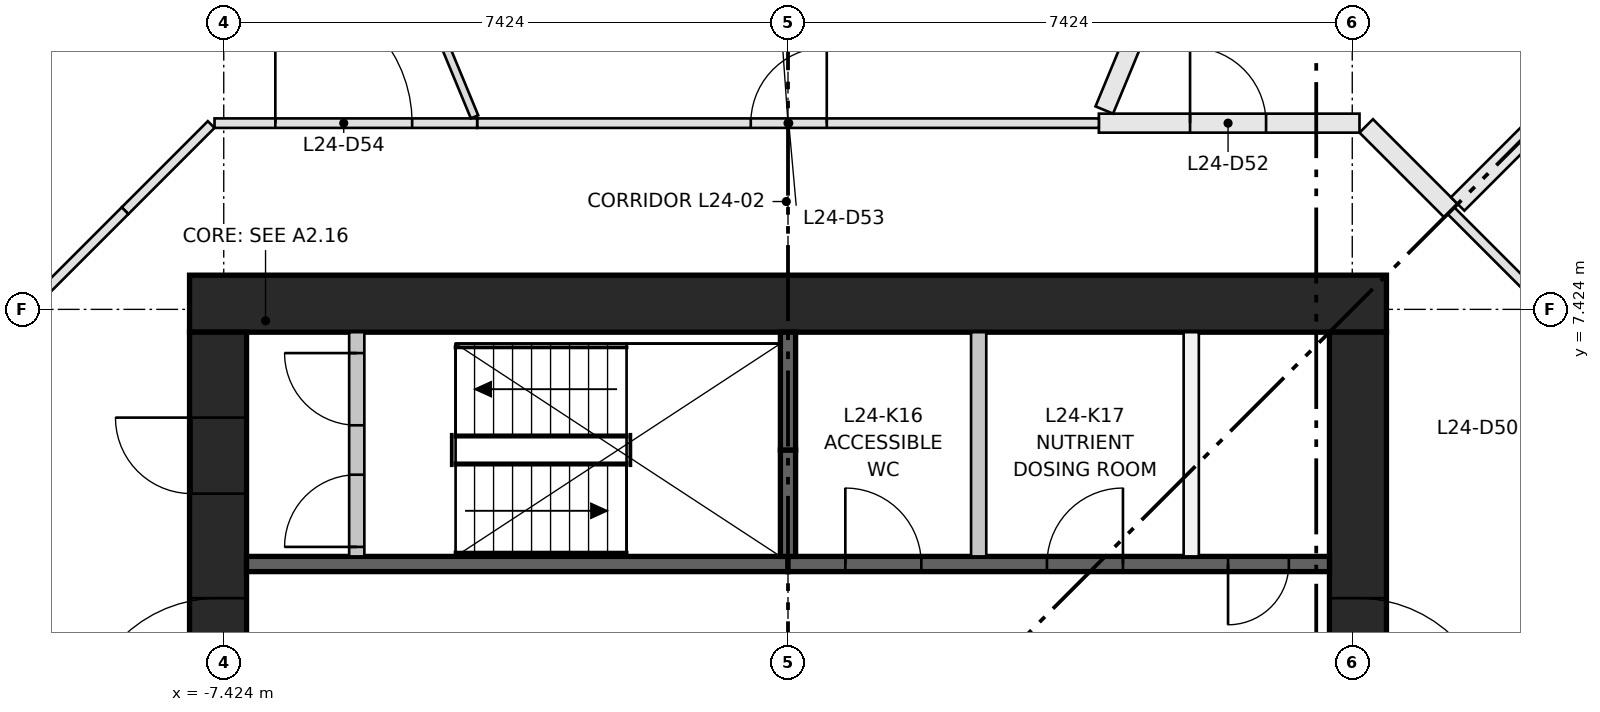
"""IFC4 building model, lengths in metres.
Left out: names, types, materials, properties, quantities, classifications, styles, units other than length and angle.
Written with IfcOpenShell. Run it as: python <this file> out.ifc"""

import sys

from ifc_helpers import new_model, si_unit, direction, frame, frame_2d, origin, place, context, subcontext, project, spatial, rectangle, extrude, element, fill, save


model = new_model("IFC4")
c1 = context("Model", 3, precision=1e-05, world=origin(), true_north=direction((0.0, 1.0)))
c2 = subcontext(c1, "Body", "Model", "MODEL_VIEW")
j1 = project(units=[si_unit("LENGTHUNIT", "METRE"), si_unit("PLANEANGLEUNIT", "RADIAN")], contexts=[c1])
p1 = place(None, origin())
s1 = spatial("IfcSite", under=j1, at=p1, CompositionType="ELEMENT")
p2 = place(p1, origin())
s2 = spatial("IfcBuilding", under=s1, at=p2, CompositionType="ELEMENT")
p3 = place(p2, frame((0.0, 0.0, 94.65)))
s3 = spatial("IfcBuildingStorey", under=s2, at=p3, CompositionType="ELEMENT", Elevation=94.65)
p4 = place(p3, frame((-7.874, 7.499, 0.0), z_axis=(0.0, 0.0, 1.0), x_axis=(1.0, 0.0, 0.0)))
e1 = element("IfcWall", 1, at=p4, inside=s3, PredefinedType="SHEAR", context=c2, shape_type="SweptSolid", body=[
    extrude(rectangle(XDim=15.748, YDim=0.75, at=frame_2d((7.874, 0.0))), origin(), (0.0, 0.0, 1.0), 3.65),
])
p5 = place(p3, frame((-7.499, -7.124, 0.0), z_axis=(0.0, 0.0, 1.0), x_axis=(0.0, 1.0, 0.0)))
e2 = element("IfcWall", 2, at=p5, inside=s3, PredefinedType="SHEAR", context=c2, shape_type="SweptSolid", body=[
    extrude(rectangle(XDim=14.248, YDim=0.75, at=frame_2d((7.124, 0.0))), origin(), (0.0, 0.0, 1.0), 3.65),
])
p6 = place(p5, frame((6.624, 0.0, 0.0)))
e3 = element("IfcOpeningElement", 3, at=p6, cuts=e2, PredefinedType="OPENING", context=c2, shape_type="SweptSolid", body=[
    extrude(rectangle(XDim=1.0, YDim=2.1, at=frame_2d((0.5, 1.05))), frame((0.0, 0.385, 0.0), z_axis=(0.0, -1.0, 0.0), x_axis=(1.0, 0.0, 0.0)), (0.0, 0.0, 1.0), 0.77),
])
p7 = place(p5, frame((3.5, 0.0, 0.0)))
e4 = element("IfcOpeningElement", 4, at=p7, cuts=e2, PredefinedType="OPENING", context=c2, shape_type="SweptSolid", body=[
    extrude(rectangle(XDim=1.8, YDim=2.1, at=frame_2d((0.9, 1.05))), frame((0.0, 0.385, 0.0), z_axis=(0.0, -1.0, 0.0), x_axis=(1.0, 0.0, 0.0)), (0.0, 0.0, 1.0), 0.77),
])
p8 = place(p5, frame((8.948, 0.0, 0.0)))
e5 = element("IfcOpeningElement", 5, at=p8, cuts=e2, PredefinedType="OPENING", context=c2, shape_type="SweptSolid", body=[
    extrude(rectangle(XDim=1.8, YDim=2.1, at=frame_2d((0.9, 1.05))), frame((0.0, 0.385, 0.0), z_axis=(0.0, -1.0, 0.0), x_axis=(1.0, 0.0, 0.0)), (0.0, 0.0, 1.0), 0.77),
])
p9 = place(p5, frame((12.124, 0.0, 0.0)))
e6 = element("IfcOpeningElement", 6, at=p9, cuts=e2, PredefinedType="OPENING", context=c2, shape_type="SweptSolid", body=[
    extrude(rectangle(XDim=1.0, YDim=2.1, at=frame_2d((0.5, 1.05))), frame((0.0, 0.385, 0.0), z_axis=(0.0, -1.0, 0.0), x_axis=(1.0, 0.0, 0.0)), (0.0, 0.0, 1.0), 0.77),
])
p10 = place(p3, frame((7.499, -7.124, 0.0), z_axis=(0.0, 0.0, 1.0), x_axis=(0.0, 1.0, 0.0)))
e7 = element("IfcWall", 7, at=p10, inside=s3, PredefinedType="SHEAR", context=c2, shape_type="SweptSolid", body=[
    extrude(rectangle(XDim=14.248, YDim=0.75, at=frame_2d((7.124, 0.0))), origin(), (0.0, 0.0, 1.0), 3.65),
])
p11 = place(p10, frame((6.624, 0.0, 0.0)))
e8 = element("IfcOpeningElement", 8, at=p11, cuts=e7, PredefinedType="OPENING", context=c2, shape_type="SweptSolid", body=[
    extrude(rectangle(XDim=1.0, YDim=2.1, at=frame_2d((0.5, 1.05))), frame((0.0, 0.385, 0.0), z_axis=(0.0, -1.0, 0.0), x_axis=(1.0, 0.0, 0.0)), (0.0, 0.0, 1.0), 0.77),
])
p12 = place(p10, frame((3.5, 0.0, 0.0)))
e9 = element("IfcOpeningElement", 9, at=p12, cuts=e7, PredefinedType="OPENING", context=c2, shape_type="SweptSolid", body=[
    extrude(rectangle(XDim=1.8, YDim=2.1, at=frame_2d((0.9, 1.05))), frame((0.0, 0.385, 0.0), z_axis=(0.0, -1.0, 0.0), x_axis=(1.0, 0.0, 0.0)), (0.0, 0.0, 1.0), 0.77),
])
p13 = place(p10, frame((8.948, 0.0, 0.0)))
e10 = element("IfcOpeningElement", 10, at=p13, cuts=e7, PredefinedType="OPENING", context=c2, shape_type="SweptSolid", body=[
    extrude(rectangle(XDim=1.8, YDim=2.1, at=frame_2d((0.9, 1.05))), frame((0.0, 0.385, 0.0), z_axis=(0.0, -1.0, 0.0), x_axis=(1.0, 0.0, 0.0)), (0.0, 0.0, 1.0), 0.77),
])
p14 = place(p3, frame((-7.124, 4.074, 0.0), z_axis=(0.0, 0.0, 1.0), x_axis=(1.0, 0.0, 0.0)))
e11 = element("IfcWall", 11, at=p14, inside=s3, PredefinedType="SHEAR", context=c2, shape_type="SweptSolid", body=[
    extrude(rectangle(XDim=7.124, YDim=0.2, at=frame_2d((3.562, 0.0))), origin(), (0.0, 0.0, 1.0), 3.3),
])
p15 = place(p3, frame((0.0, 4.074, 0.0), z_axis=(0.0, 0.0, 1.0), x_axis=(1.0, 0.0, 0.0)))
e12 = element("IfcWall", 12, at=p15, inside=s3, PredefinedType="SHEAR", context=c2, shape_type="SweptSolid", body=[
    extrude(rectangle(XDim=7.124, YDim=0.2, at=frame_2d((3.562, 0.0))), origin(), (0.0, 0.0, 1.0), 3.3),
])
p16 = place(p15, frame((0.754, 0.0, 0.0)))
e13 = element("IfcOpeningElement", 13, at=p16, cuts=e12, PredefinedType="OPENING", context=c2, shape_type="SweptSolid", body=[
    extrude(rectangle(XDim=1.0, YDim=2.1, at=frame_2d((0.5, 1.05))), frame((0.0, 0.11, 0.0), z_axis=(0.0, -1.0, 0.0), x_axis=(1.0, 0.0, 0.0)), (0.0, 0.0, 1.0), 0.22),
])
p17 = place(p15, frame((3.407, 0.0, 0.0)))
e14 = element("IfcOpeningElement", 14, at=p17, cuts=e12, PredefinedType="OPENING", context=c2, shape_type="SweptSolid", body=[
    extrude(rectangle(XDim=1.0, YDim=2.1, at=frame_2d((0.5, 1.05))), frame((0.0, 0.11, 0.0), z_axis=(0.0, -1.0, 0.0), x_axis=(1.0, 0.0, 0.0)), (0.0, 0.0, 1.0), 0.22),
])
p18 = place(p15, frame((5.79, 0.0, 0.0)))
e15 = element("IfcOpeningElement", 15, at=p18, cuts=e12, PredefinedType="OPENING", context=c2, shape_type="SweptSolid", body=[
    extrude(rectangle(XDim=0.8, YDim=2.1, at=frame_2d((0.4, 1.05))), frame((0.0, 0.11, 0.0), z_axis=(0.0, -1.0, 0.0), x_axis=(1.0, 0.0, 0.0)), (0.0, 0.0, 1.0), 0.22),
])
p19 = place(p3, frame((0.0, 4.174, 0.0), z_axis=(0.0, 0.0, 1.0), x_axis=(0.0, 1.0, 0.0)))
e16 = element("IfcWall", 16, at=p19, inside=s3, PredefinedType="SHEAR", context=c2, shape_type="SweptSolid", body=[
    extrude(rectangle(XDim=1.4, YDim=0.2, at=frame_2d((0.7, 0.0))), origin(), (0.0, 0.0, 1.0), 3.3),
])
p20 = place(p3, frame((0.0, 5.574, 0.0), z_axis=(0.0, 0.0, 1.0), x_axis=(0.0, 1.0, 0.0)))
e17 = element("IfcWall", 17, at=p20, inside=s3, PredefinedType="SHEAR", context=c2, shape_type="SweptSolid", body=[
    extrude(rectangle(XDim=1.55, YDim=0.2, at=frame_2d((0.775, 0.0))), origin(), (0.0, 0.0, 1.0), 3.3),
])
for number, where, z_axis, x_axis in (
    (18, (2.509, 4.174, 0.0), (0.0, 0.0, 1.0), (0.0, 1.0, 0.0)),
    (19, (5.305, 4.174, 0.0), (0.0, 0.0, 1.0), (0.0, 1.0, 0.0)),
):
    element("IfcWall", number, at=place(p3, frame(where, z_axis=z_axis, x_axis=x_axis)), inside=s3, PredefinedType="PARTITIONING", context=c2, shape_type="SweptSolid", body=[
        extrude(rectangle(XDim=2.95, YDim=0.2, at=frame_2d((1.475, 0.0))), origin(), (0.0, 0.0, 1.0), 3.3),
    ])
p21 = place(p3, frame((-5.674, 4.174, 0.0), z_axis=(0.0, 0.0, 1.0), x_axis=(0.0, 1.0, 0.0)))
e20 = element("IfcWall", 20, at=p21, inside=s3, PredefinedType="PARTITIONING", context=c2, shape_type="SweptSolid", body=[
    extrude(rectangle(XDim=2.95, YDim=0.2, at=frame_2d((1.475, 0.0))), origin(), (0.0, 0.0, 1.0), 3.3),
])
p22 = place(p21, frame((0.125, 0.0, 0.0)))
e21 = element("IfcOpeningElement", 21, at=p22, cuts=e20, PredefinedType="OPENING", context=c2, shape_type="SweptSolid", body=[
    extrude(rectangle(XDim=0.95, YDim=2.1, at=frame_2d((0.475, 1.05))), frame((0.0, 0.11, 0.0), z_axis=(0.0, -1.0, 0.0), x_axis=(1.0, 0.0, 0.0)), (0.0, 0.0, 1.0), 0.22),
])
p23 = place(p21, frame((1.725, 0.0, 0.0)))
e22 = element("IfcOpeningElement", 22, at=p23, cuts=e20, PredefinedType="OPENING", context=c2, shape_type="SweptSolid", body=[
    extrude(rectangle(XDim=0.95, YDim=2.1, at=frame_2d((0.475, 1.05))), frame((0.0, 0.11, 0.0), z_axis=(0.0, -1.0, 0.0), x_axis=(1.0, 0.0, 0.0)), (0.0, 0.0, 1.0), 0.22),
])
p24 = place(p3, frame((8.722, 8.722, 0.0), z_axis=(0.0, 0.0, 1.0), x_axis=(0.70718294931, -0.707030604857, 0.0)))
e23 = element("IfcWall", 23, at=p24, inside=s3, PredefinedType="PARTITIONING", context=c2, shape_type="SweptSolid", body=[
    extrude(rectangle(XDim=1.603, YDim=0.125, at=frame_2d((0.801, 0.0))), origin(), (0.0, 0.0, 1.0), 3.3),
])
p25 = place(p3, frame((4.09, 9.874, 0.0), z_axis=(0.0, 0.0, 1.0), x_axis=(1.0, 0.0, 0.0)))
e24 = element("IfcWall", 24, at=p25, inside=s3, PredefinedType="PARTITIONING", context=c2, shape_type="SweptSolid", body=[
    extrude(rectangle(XDim=3.429, YDim=0.25, at=frame_2d((1.715, 0.0))), origin(), (0.0, 0.0, 1.0), 3.3),
])
p26 = place(p25, frame((1.2, 0.0, 0.0)))
e25 = element("IfcOpeningElement", 25, at=p26, cuts=e24, PredefinedType="OPENING", context=c2, shape_type="SweptSolid", body=[
    extrude(rectangle(XDim=1.0, YDim=2.1, at=frame_2d((0.5, 1.05))), frame((0.0, 0.135, 0.0), z_axis=(0.0, -1.0, 0.0), x_axis=(1.0, 0.0, 0.0)), (0.0, 0.0, 1.0), 0.27),
])
p27 = place(p3, frame((7.608, 9.837, 0.0), z_axis=(0.0, 0.0, 1.0), x_axis=(0.707029353672, -0.707184200224, 0.0)))
e26 = element("IfcWall", 26, at=p27, inside=s3, PredefinedType="PARTITIONING", context=c2, shape_type="SweptSolid", body=[
    extrude(rectangle(XDim=1.577, YDim=0.25, at=frame_2d((0.788, 0.0))), origin(), (0.0, 0.0, 1.0), 3.3),
])
p28 = place(p3, frame((-4.09, 9.874, 0.0), z_axis=(0.0, 0.0, 1.0), x_axis=(1.0, 0.0, 0.0)))
e27 = element("IfcWall", 27, at=p28, inside=s3, PredefinedType="PARTITIONING", context=c2, shape_type="SweptSolid", body=[
    extrude(rectangle(XDim=8.18, YDim=0.125, at=frame_2d((4.09, 0.0))), origin(), (0.0, 0.0, 1.0), 3.3),
])
p29 = place(p28, frame((3.6, 0.0, 0.0)))
e28 = element("IfcOpeningElement", 28, at=p29, cuts=e27, PredefinedType="OPENING", context=c2, shape_type="SweptSolid", body=[
    extrude(rectangle(XDim=1.0, YDim=2.1, at=frame_2d((0.5, 1.05))), frame((0.0, 0.073, 0.0), z_axis=(0.0, -1.0, 0.0), x_axis=(1.0, 0.0, 0.0)), (0.0, 0.0, 1.0), 0.145),
])
p30 = place(p3, frame((-8.722, 8.722, 0.0), z_axis=(0.0, 0.0, 1.0), x_axis=(0.707030604857, 0.70718294931, 0.0)))
e29 = element("IfcWall", 29, at=p30, inside=s3, PredefinedType="PARTITIONING", context=c2, shape_type="SweptSolid", body=[
    extrude(rectangle(XDim=1.603, YDim=0.125, at=frame_2d((0.801, 0.0))), origin(), (0.0, 0.0, 1.0), 3.3),
])
p31 = place(p3, frame((-7.545, 9.874, 0.0), z_axis=(0.0, 0.0, 1.0), x_axis=(1.0, 0.0, 0.0)))
e30 = element("IfcWall", 30, at=p31, inside=s3, PredefinedType="PARTITIONING", context=c2, shape_type="SweptSolid", body=[
    extrude(rectangle(XDim=3.455, YDim=0.125, at=frame_2d((1.728, 0.0))), origin(), (0.0, 0.0, 1.0), 3.3),
])
p32 = place(p31, frame((0.8, 0.0, 0.0)))
e31 = element("IfcOpeningElement", 31, at=p32, cuts=e30, PredefinedType="OPENING", context=c2, shape_type="SweptSolid", body=[
    extrude(rectangle(XDim=1.8, YDim=2.1, at=frame_2d((0.9, 1.05))), frame((0.0, 0.073, 0.0), z_axis=(0.0, -1.0, 0.0), x_axis=(1.0, 0.0, 0.0)), (0.0, 0.0, 1.0), 0.145),
])
p33 = place(p3, frame((-9.856, 7.589, 0.0), z_axis=(0.0, 0.0, 1.0), x_axis=(0.70718294931, 0.707030604857, 0.0)))
e32 = element("IfcWall", 32, at=p33, inside=s3, PredefinedType="PARTITIONING", context=c2, shape_type="SweptSolid", body=[
    extrude(rectangle(XDim=1.603, YDim=0.125, at=frame_2d((0.801, 0.0))), origin(), (0.0, 0.0, 1.0), 3.3),
])
p34 = place(p3, frame((12.792, 12.792, 0.0), z_axis=(0.0, 0.0, 1.0), x_axis=(-0.707106781187, -0.707106781187, 0.0)))
e33 = element("IfcWall", 33, at=p34, inside=s3, PredefinedType="PARTITIONING", context=c2, shape_type="SweptSolid", body=[
    extrude(rectangle(XDim=5.63, YDim=0.25, at=frame_2d((2.815, 0.0))), origin(), (0.0, 0.0, 1.0), 3.3),
])
p35 = place(p3, frame((4.162, 10.047, 0.0), z_axis=(0.0, 0.0, 1.0), x_axis=(0.382666699469, 0.923886463326, 0.0)))
e34 = element("IfcWall", 34, at=p35, inside=s3, PredefinedType="PARTITIONING", context=c2, shape_type="SweptSolid", body=[
    extrude(rectangle(XDim=4.245, YDim=0.25, at=frame_2d((2.123, 0.0))), origin(), (0.0, 0.0, 1.0), 3.3),
])
p36 = place(p3, frame((-4.124, 9.957, 0.0), z_axis=(0.0, 0.0, 1.0), x_axis=(-0.382702629741, 0.923871580464, 0.0)))
e35 = element("IfcWall", 35, at=p36, inside=s3, PredefinedType="PARTITIONING", context=c2, shape_type="SweptSolid", body=[
    extrude(rectangle(XDim=4.343, YDim=0.105, at=frame_2d((2.171, 0.0))), origin(), (0.0, 0.0, 1.0), 3.3),
])
p37 = place(p22, origin())
e36 = element("IfcDoor", 36, at=p37, inside=s3, OperationType="SINGLE_SWING_LEFT", PredefinedType="DOOR", context=c2, shape_type="SweptSolid", body=[
    extrude(rectangle(XDim=0.95, YDim=2.1, at=frame_2d((0.475, 1.05))), frame((0.0, 0.025, 0.0), z_axis=(0.0, -1.0, 0.0), x_axis=(1.0, 0.0, 0.0)), (0.0, 0.0, 1.0), 0.05),
])
fill(e21, e36)
p38 = place(p23, origin())
e37 = element("IfcDoor", 37, at=p38, inside=s3, OperationType="SINGLE_SWING_RIGHT", PredefinedType="DOOR", context=c2, shape_type="SweptSolid", body=[
    extrude(rectangle(XDim=0.95, YDim=2.1, at=frame_2d((0.475, 1.05))), frame((0.0, 0.025, 0.0), z_axis=(0.0, -1.0, 0.0), x_axis=(1.0, 0.0, 0.0)), (0.0, 0.0, 1.0), 0.05),
])
fill(e22, e37)
p39 = place(p16, origin())
e38 = element("IfcDoor", 38, at=p39, inside=s3, OperationType="SINGLE_SWING_LEFT", PredefinedType="DOOR", context=c2, shape_type="SweptSolid", body=[
    extrude(rectangle(XDim=1.0, YDim=2.1, at=frame_2d((0.5, 1.05))), frame((0.0, 0.025, 0.0), z_axis=(0.0, -1.0, 0.0), x_axis=(1.0, 0.0, 0.0)), (0.0, 0.0, 1.0), 0.05),
])
fill(e13, e38)
p40 = place(p17, origin())
e39 = element("IfcDoor", 39, at=p40, inside=s3, OperationType="SINGLE_SWING_RIGHT", PredefinedType="DOOR", context=c2, shape_type="SweptSolid", body=[
    extrude(rectangle(XDim=1.0, YDim=2.1, at=frame_2d((0.5, 1.05))), frame((0.0, 0.025, 0.0), z_axis=(0.0, -1.0, 0.0), x_axis=(1.0, 0.0, 0.0)), (0.0, 0.0, 1.0), 0.05),
])
fill(e14, e39)
p41 = place(p18, frame((0.8, 0.0, 0.0), z_axis=(0.0, 0.0, 1.0), x_axis=(-1.0, 0.0, 0.0)))
e40 = element("IfcDoor", 40, at=p41, inside=s3, OperationType="SINGLE_SWING_LEFT", PredefinedType="DOOR", context=c2, shape_type="SweptSolid", body=[
    extrude(rectangle(XDim=0.8, YDim=2.1, at=frame_2d((0.4, 1.05))), frame((0.0, 0.025, 0.0), z_axis=(0.0, -1.0, 0.0), x_axis=(1.0, 0.0, 0.0)), (0.0, 0.0, 1.0), 0.05),
])
fill(e15, e40)
p42 = place(p8, origin())
e41 = element("IfcDoor", 41, at=p42, inside=s3, OperationType="DOUBLE_DOOR_SINGLE_SWING", PredefinedType="DOOR", context=c2, shape_type="SweptSolid", body=[
    extrude(rectangle(XDim=1.8, YDim=2.1, at=frame_2d((0.9, 1.05))), frame((0.0, 0.025, 0.0), z_axis=(0.0, -1.0, 0.0), x_axis=(1.0, 0.0, 0.0)), (0.0, 0.0, 1.0), 0.05),
])
fill(e5, e41)
p43 = place(p9, origin())
e42 = element("IfcDoor", 42, at=p43, inside=s3, OperationType="SINGLE_SWING_RIGHT", PredefinedType="DOOR", context=c2, shape_type="SweptSolid", body=[
    extrude(rectangle(XDim=1.0, YDim=2.1, at=frame_2d((0.5, 1.05))), frame((0.0, 0.375, 0.0), z_axis=(0.0, -1.0, 0.0), x_axis=(1.0, 0.0, 0.0)), (0.0, 0.0, 1.0), 0.05),
])
fill(e6, e42)
p44 = place(p13, frame((1.8, 0.0, 0.0), z_axis=(0.0, 0.0, 1.0), x_axis=(-1.0, 0.0, 0.0)))
e43 = element("IfcDoor", 43, at=p44, inside=s3, OperationType="DOUBLE_DOOR_SINGLE_SWING", PredefinedType="DOOR", context=c2, shape_type="SweptSolid", body=[
    extrude(rectangle(XDim=1.8, YDim=2.1, at=frame_2d((0.9, 1.05))), frame((0.0, 0.025, 0.0), z_axis=(0.0, -1.0, 0.0), x_axis=(1.0, 0.0, 0.0)), (0.0, 0.0, 1.0), 0.05),
])
fill(e10, e43)
p45 = place(p26, origin())
e44 = element("IfcDoor", 44, at=p45, inside=s3, OperationType="SINGLE_SWING_LEFT", PredefinedType="DOOR", context=c2, shape_type="SweptSolid", body=[
    extrude(rectangle(XDim=1.0, YDim=2.1, at=frame_2d((0.5, 1.05))), frame((0.0, 0.025, 0.0), z_axis=(0.0, -1.0, 0.0), x_axis=(1.0, 0.0, 0.0)), (0.0, 0.0, 1.0), 0.05),
])
fill(e25, e44)
p46 = place(p29, origin())
e45 = element("IfcDoor", 45, at=p46, inside=s3, OperationType="SINGLE_SWING_RIGHT", PredefinedType="DOOR", context=c2, shape_type="SweptSolid", body=[
    extrude(rectangle(XDim=1.0, YDim=2.1, at=frame_2d((0.5, 1.05))), frame((0.0, 0.025, 0.0), z_axis=(0.0, -1.0, 0.0), x_axis=(1.0, 0.0, 0.0)), (0.0, 0.0, 1.0), 0.05),
])
fill(e28, e45)
p47 = place(p32, origin())
e46 = element("IfcDoor", 46, at=p47, inside=s3, OperationType="DOUBLE_DOOR_SINGLE_SWING", PredefinedType="DOOR", context=c2, shape_type="SweptSolid", body=[
    extrude(rectangle(XDim=1.8, YDim=2.1, at=frame_2d((0.9, 1.05))), frame((0.0, 0.025, 0.0), z_axis=(0.0, -1.0, 0.0), x_axis=(1.0, 0.0, 0.0)), (0.0, 0.0, 1.0), 0.05),
])
fill(e31, e46)
save(model, sys.argv[1])
